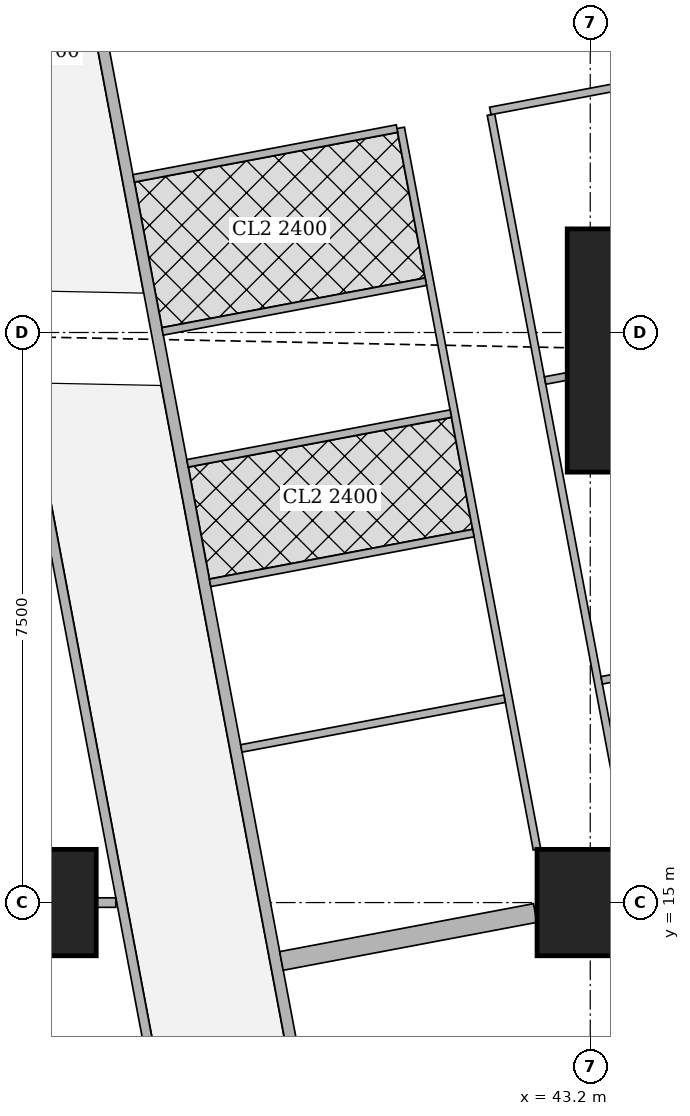
"""IFC4 building model, lengths in metres.
Left out: names, types, materials, properties, quantities, classifications, styles, units other than length and angle.
Written with IfcOpenShell. Run it as: python <this file> out.ifc"""

import sys

from ifc_helpers import new_model, si_unit, direction, frame, frame_2d, origin, origin_2d, place, context, subcontext, project, spatial, rectangle, extrude, element, fill, save


model = new_model("IFC4")
c1 = context("Model", 3, precision=1e-05, world=origin(), true_north=direction((0.0, 1.0)))
c2 = subcontext(c1, "Body", "Model", "MODEL_VIEW")
j1 = project(units=[si_unit("LENGTHUNIT", "METRE"), si_unit("PLANEANGLEUNIT", "RADIAN")], contexts=[c1])
p1 = place(None, origin())
s1 = spatial("IfcSite", under=j1, at=p1, CompositionType="ELEMENT")
p2 = place(p1, origin())
s2 = spatial("IfcBuilding", under=s1, at=p2, CompositionType="ELEMENT")
p3 = place(p2, frame((0.0, 0.0, 204.95)))
s3 = spatial("IfcBuildingStorey", under=s2, at=p3, CompositionType="ELEMENT", Elevation=204.95)
for number, where, z_axis, x_axis in (
    (1, (36.0, 15.0, 0.0), (0.0, 0.0, 1.0), (1.0, 0.0, 0.0)),
    (2, (43.2, 15.0, 0.0), (0.0, 0.0, 1.0), (1.0, 0.0, 0.0)),
):
    element("IfcColumn", number, at=place(p3, frame(where, z_axis=z_axis, x_axis=x_axis)), inside=s3, PredefinedType="COLUMN", context=c2, shape_type="SweptSolid", body=[
        extrude(rectangle(XDim=1.4, YDim=1.4, at=origin_2d()), origin(), (0.0, 0.0, 1.0), 3.75),
    ])
p4 = place(p3, frame((44.697, 22.263, 0.0), z_axis=(0.0, 0.0, 1.0), x_axis=(1.0, 0.0, 0.0)))
e3 = element("IfcColumn", 3, at=p4, inside=s3, PredefinedType="COLUMN", context=c2, shape_type="SweptSolid", body=[
    extrude(rectangle(XDim=3.6, YDim=3.2, at=origin_2d()), origin(), (0.0, 0.0, 1.0), 3.75),
])
p5 = place(p3, frame((50.653, 2.703, 0.0), z_axis=(0.0, 0.0, 1.0), x_axis=(-0.185612026696, 0.982623109613, 0.0)))
e4 = element("IfcWall", 4, at=p5, inside=s3, PredefinedType="SOLIDWALL", context=c2, shape_type="SweptSolid", body=[
    extrude(rectangle(XDim=41.393, YDim=0.2, at=frame_2d((20.697, 0.0))), origin(), (0.0, 0.0, 1.0), 3.5),
])
p6 = place(p5, frame((1.633, 0.0, 0.9)))
e5 = element("IfcOpeningElement", 5, at=p6, cuts=e4, PredefinedType="OPENING", context=c2, shape_type="SweptSolid", body=[
    extrude(rectangle(XDim=1.8, YDim=1.5, at=frame_2d((0.9, 0.75))), frame((0.0, 0.11, 0.0), z_axis=(0.0, -1.0, 0.0), x_axis=(1.0, 0.0, 0.0)), (0.0, 0.0, 1.0), 0.22),
])
p7 = place(p5, frame((6.032, 0.0, 0.9)))
e6 = element("IfcOpeningElement", 6, at=p7, cuts=e4, PredefinedType="OPENING", context=c2, shape_type="SweptSolid", body=[
    extrude(rectangle(XDim=1.8, YDim=1.5, at=frame_2d((0.9, 0.75))), frame((0.0, 0.11, 0.0), z_axis=(0.0, -1.0, 0.0), x_axis=(1.0, 0.0, 0.0)), (0.0, 0.0, 1.0), 0.22),
])
p8 = place(p5, frame((9.848, 0.0, 0.9)))
e7 = element("IfcOpeningElement", 7, at=p8, cuts=e4, PredefinedType="OPENING", context=c2, shape_type="SweptSolid", body=[
    extrude(rectangle(XDim=1.8, YDim=1.5, at=frame_2d((0.9, 0.75))), frame((0.0, 0.11, 0.0), z_axis=(0.0, -1.0, 0.0), x_axis=(1.0, 0.0, 0.0)), (0.0, 0.0, 1.0), 0.22),
])
p9 = place(p5, frame((13.664, 0.0, 0.9)))
e8 = element("IfcOpeningElement", 8, at=p9, cuts=e4, PredefinedType="OPENING", context=c2, shape_type="SweptSolid", body=[
    extrude(rectangle(XDim=1.8, YDim=1.5, at=frame_2d((0.9, 0.75))), frame((0.0, 0.11, 0.0), z_axis=(0.0, -1.0, 0.0), x_axis=(1.0, 0.0, 0.0)), (0.0, 0.0, 1.0), 0.22),
])
p10 = place(p5, frame((17.481, 0.0, 0.9)))
e9 = element("IfcOpeningElement", 9, at=p10, cuts=e4, PredefinedType="OPENING", context=c2, shape_type="SweptSolid", body=[
    extrude(rectangle(XDim=1.8, YDim=1.5, at=frame_2d((0.9, 0.75))), frame((0.0, 0.11, 0.0), z_axis=(0.0, -1.0, 0.0), x_axis=(1.0, 0.0, 0.0)), (0.0, 0.0, 1.0), 0.22),
])
p11 = place(p5, frame((21.297, 0.0, 0.9)))
e10 = element("IfcOpeningElement", 10, at=p11, cuts=e4, PredefinedType="OPENING", context=c2, shape_type="SweptSolid", body=[
    extrude(rectangle(XDim=1.8, YDim=1.5, at=frame_2d((0.9, 0.75))), frame((0.0, 0.11, 0.0), z_axis=(0.0, -1.0, 0.0), x_axis=(1.0, 0.0, 0.0)), (0.0, 0.0, 1.0), 0.22),
])
p12 = place(p5, frame((25.113, 0.0, 0.9)))
e11 = element("IfcOpeningElement", 11, at=p12, cuts=e4, PredefinedType="OPENING", context=c2, shape_type="SweptSolid", body=[
    extrude(rectangle(XDim=1.8, YDim=1.5, at=frame_2d((0.9, 0.75))), frame((0.0, 0.11, 0.0), z_axis=(0.0, -1.0, 0.0), x_axis=(1.0, 0.0, 0.0)), (0.0, 0.0, 1.0), 0.22),
])
p13 = place(p5, frame((28.93, 0.0, 0.9)))
e12 = element("IfcOpeningElement", 12, at=p13, cuts=e4, PredefinedType="OPENING", context=c2, shape_type="SweptSolid", body=[
    extrude(rectangle(XDim=1.8, YDim=1.5, at=frame_2d((0.9, 0.75))), frame((0.0, 0.11, 0.0), z_axis=(0.0, -1.0, 0.0), x_axis=(1.0, 0.0, 0.0)), (0.0, 0.0, 1.0), 0.22),
])
p14 = place(p5, frame((32.746, 0.0, 0.9)))
e13 = element("IfcOpeningElement", 13, at=p14, cuts=e4, PredefinedType="OPENING", context=c2, shape_type="SweptSolid", body=[
    extrude(rectangle(XDim=1.8, YDim=1.5, at=frame_2d((0.9, 0.75))), frame((0.0, 0.11, 0.0), z_axis=(0.0, -1.0, 0.0), x_axis=(1.0, 0.0, 0.0)), (0.0, 0.0, 1.0), 0.22),
])
p15 = place(p5, frame((36.481, 0.0, 0.9)))
e14 = element("IfcOpeningElement", 14, at=p15, cuts=e4, PredefinedType="OPENING", context=c2, shape_type="SweptSolid", body=[
    extrude(rectangle(XDim=1.8, YDim=1.5, at=frame_2d((0.9, 0.75))), frame((0.0, 0.11, 0.0), z_axis=(0.0, -1.0, 0.0), x_axis=(1.0, 0.0, 0.0)), (0.0, 0.0, 1.0), 0.22),
])
p16 = place(p3, frame((33.68, 42.723, 0.0), z_axis=(0.0, 0.0, 1.0), x_axis=(0.185601160014, -0.982625162207, 0.0)))
e15 = element("IfcWall", 15, at=p16, inside=s3, PredefinedType="SOLIDWALL", context=c2, shape_type="SweptSolid", body=[
    extrude(rectangle(XDim=41.051, YDim=0.15, at=frame_2d((20.526, 0.0))), origin(), (0.0, 0.0, 1.0), 2.5),
])
p17 = place(p16, frame((12.307, 0.0, 0.0)))
e16 = element("IfcOpeningElement", 16, at=p17, cuts=e15, PredefinedType="OPENING", context=c2, shape_type="SweptSolid", body=[
    extrude(rectangle(XDim=1.0, YDim=2.1, at=frame_2d((0.5, 1.05))), frame((0.0, 0.085, 0.0), z_axis=(0.0, -1.0, 0.0), x_axis=(1.0, 0.0, 0.0)), (0.0, 0.0, 1.0), 0.17),
])
p18 = place(p16, frame((16.123, 0.0, 0.0)))
e17 = element("IfcOpeningElement", 17, at=p18, cuts=e15, PredefinedType="OPENING", context=c2, shape_type="SweptSolid", body=[
    extrude(rectangle(XDim=1.0, YDim=2.1, at=frame_2d((0.5, 1.05))), frame((0.0, 0.085, 0.0), z_axis=(0.0, -1.0, 0.0), x_axis=(1.0, 0.0, 0.0)), (0.0, 0.0, 1.0), 0.17),
])
p19 = place(p16, frame((30.902, 0.0, 0.0)))
e18 = element("IfcOpeningElement", 18, at=p19, cuts=e15, PredefinedType="OPENING", context=c2, shape_type="SweptSolid", body=[
    extrude(rectangle(XDim=1.0, YDim=2.1, at=frame_2d((0.5, 1.05))), frame((0.0, 0.085, 0.0), z_axis=(0.0, -1.0, 0.0), x_axis=(1.0, 0.0, 0.0)), (0.0, 0.0, 1.0), 0.17),
])
p20 = place(p3, frame((41.894, 25.366, 0.0), z_axis=(0.0, 0.0, 1.0), x_axis=(0.185612905165, -0.982622943675, 0.0)))
e19 = element("IfcWall", 19, at=p20, inside=s3, PredefinedType="PARTITIONING", context=c2, shape_type="SweptSolid", body=[
    extrude(rectangle(XDim=9.827, YDim=0.1, at=frame_2d((4.913, 0.0))), origin(), (0.0, 0.0, 1.0), 2.5),
])
p21 = place(p20, frame((0.151, 0.0, 0.0)))
e20 = element("IfcOpeningElement", 20, at=p21, cuts=e19, PredefinedType="OPENING", context=c2, shape_type="SweptSolid", body=[
    extrude(rectangle(XDim=0.9, YDim=2.1, at=frame_2d((0.45, 1.05))), frame((0.0, 0.06, 0.0), z_axis=(0.0, -1.0, 0.0), x_axis=(1.0, 0.0, 0.0)), (0.0, 0.0, 1.0), 0.12),
])
p22 = place(p20, frame((5.05, 0.0, 0.0)))
e21 = element("IfcOpeningElement", 21, at=p22, cuts=e19, PredefinedType="OPENING", context=c2, shape_type="SweptSolid", body=[
    extrude(rectangle(XDim=0.9, YDim=2.1, at=frame_2d((0.45, 1.05))), frame((0.0, 0.06, 0.0), z_axis=(0.0, -1.0, 0.0), x_axis=(1.0, 0.0, 0.0)), (0.0, 0.0, 1.0), 0.12),
])
p23 = place(p20, frame((7.783, 0.0, 0.0)))
e22 = element("IfcOpeningElement", 22, at=p23, cuts=e19, PredefinedType="OPENING", context=c2, shape_type="SweptSolid", body=[
    extrude(rectangle(XDim=0.9, YDim=2.1, at=frame_2d((0.45, 1.05))), frame((0.0, 0.06, 0.0), z_axis=(0.0, -1.0, 0.0), x_axis=(1.0, 0.0, 0.0)), (0.0, 0.0, 1.0), 0.12),
])
p24 = place(p3, frame((40.706, 25.192, 0.0), z_axis=(0.0, 0.0, 1.0), x_axis=(0.185629824463, -0.982619747547, 0.0)))
e23 = element("IfcWall", 23, at=p24, inside=s3, PredefinedType="PARTITIONING", context=c2, shape_type="SweptSolid", body=[
    extrude(rectangle(XDim=9.659, YDim=0.1, at=frame_2d((4.83, 0.0))), origin(), (0.0, 0.0, 1.0), 2.5),
])
p25 = place(p24, frame((0.575, 0.0, 0.0)))
e24 = element("IfcOpeningElement", 24, at=p25, cuts=e23, PredefinedType="OPENING", context=c2, shape_type="SweptSolid", body=[
    extrude(rectangle(XDim=0.9, YDim=2.1, at=frame_2d((0.45, 1.05))), frame((0.0, 0.06, 0.0), z_axis=(0.0, -1.0, 0.0), x_axis=(1.0, 0.0, 0.0)), (0.0, 0.0, 1.0), 0.12),
])
p26 = place(p24, frame((4.166, 0.0, 0.0)))
e25 = element("IfcOpeningElement", 25, at=p26, cuts=e23, PredefinedType="OPENING", context=c2, shape_type="SweptSolid", body=[
    extrude(rectangle(XDim=0.9, YDim=2.1, at=frame_2d((0.45, 1.05))), frame((0.0, 0.06, 0.0), z_axis=(0.0, -1.0, 0.0), x_axis=(1.0, 0.0, 0.0)), (0.0, 0.0, 1.0), 0.12),
])
p27 = place(p24, frame((2.483, 0.0, 0.0)))
e26 = element("IfcOpeningElement", 26, at=p27, cuts=e23, PredefinedType="OPENING", context=c2, shape_type="SweptSolid", body=[
    extrude(rectangle(XDim=0.9, YDim=2.1, at=frame_2d((0.45, 1.05))), frame((0.0, 0.06, 0.0), z_axis=(0.0, -1.0, 0.0), x_axis=(1.0, 0.0, 0.0)), (0.0, 0.0, 1.0), 0.12),
])
p28 = place(p24, frame((6.074, 0.0, 0.0)))
e27 = element("IfcOpeningElement", 27, at=p28, cuts=e23, PredefinedType="OPENING", context=c2, shape_type="SweptSolid", body=[
    extrude(rectangle(XDim=0.9, YDim=2.1, at=frame_2d((0.45, 1.05))), frame((0.0, 0.06, 0.0), z_axis=(0.0, -1.0, 0.0), x_axis=(1.0, 0.0, 0.0)), (0.0, 0.0, 1.0), 0.12),
])
p29 = place(p3, frame((46.11, 26.213, 0.0), z_axis=(0.0, 0.0, 1.0), x_axis=(-0.982633535512, -0.185556823879, 0.0)))
e28 = element("IfcWall", 28, at=p29, inside=s3, PredefinedType="PARTITIONING", context=c2, shape_type="SweptSolid", body=[
    extrude(rectangle(XDim=4.3, YDim=0.1, at=frame_2d((2.15, 0.0))), origin(), (0.0, 0.0, 1.0), 2.05),
])
p30 = place(p3, frame((42.887, 21.921, 0.0), z_axis=(0.0, 0.0, 1.0), x_axis=(-0.982688058078, -0.185267861514, 0.0)))
e29 = element("IfcWall", 29, at=p30, inside=s3, PredefinedType="PARTITIONING", context=c2, shape_type="SweptSolid", body=[
    extrude(rectangle(XDim=0.286, YDim=0.1, at=frame_2d((0.143, 0.0))), origin(), (0.0, 0.0, 1.0), 2.5),
])
p31 = place(p3, frame((47.527, 18.712, 0.0), z_axis=(0.0, 0.0, 1.0), x_axis=(-0.982665405803, -0.185387972203, 0.0)))
e30 = element("IfcWall", 30, at=p31, inside=s3, PredefinedType="PARTITIONING", context=c2, shape_type="SweptSolid", body=[
    extrude(rectangle(XDim=4.25, YDim=0.1, at=frame_2d((2.125, 0.0))), origin(), (0.0, 0.0, 1.0), 2.05),
])
p32 = place(p3, frame((40.657, 25.183, 0.0), z_axis=(0.0, 0.0, 1.0), x_axis=(-0.982585626838, -0.185810349366, 0.0)))
e31 = element("IfcWall", 31, at=p32, inside=s3, PredefinedType="PARTITIONING", context=c2, shape_type="SweptSolid", body=[
    extrude(rectangle(XDim=3.525, YDim=0.1, at=frame_2d((1.763, 0.0))), origin(), (0.0, 0.0, 1.0), 3.5),
])
p33 = place(p3, frame((41.365, 21.433, 0.0), z_axis=(0.0, 0.0, 1.0), x_axis=(-0.982638553676, -0.185530247748, 0.0)))
e32 = element("IfcWall", 32, at=p33, inside=s3, PredefinedType="PARTITIONING", context=c2, shape_type="SweptSolid", body=[
    extrude(rectangle(XDim=3.525, YDim=0.1, at=frame_2d((1.763, 0.0))), origin(), (0.0, 0.0, 1.0), 3.5),
])
p34 = place(p3, frame((42.073, 17.682, 0.0), z_axis=(0.0, 0.0, 1.0), x_axis=(-0.98265117712, -0.185463376723, 0.0)))
e33 = element("IfcWall", 33, at=p34, inside=s3, PredefinedType="PARTITIONING", context=c2, shape_type="SweptSolid", body=[
    extrude(rectangle(XDim=3.525, YDim=0.1, at=frame_2d((1.763, 0.0))), origin(), (0.0, 0.0, 1.0), 3.5),
])
p35 = place(p34, frame((1.325, 0.0, 0.0)))
e34 = element("IfcOpeningElement", 34, at=p35, cuts=e33, PredefinedType="OPENING", context=c2, shape_type="SweptSolid", body=[
    extrude(rectangle(XDim=0.9, YDim=2.1, at=frame_2d((0.45, 1.05))), frame((0.0, 0.06, 0.0), z_axis=(0.0, -1.0, 0.0), x_axis=(1.0, 0.0, 0.0)), (0.0, 0.0, 1.0), 0.12),
])
p36 = place(p3, frame((41.037, 23.168, 0.0), z_axis=(0.0, 0.0, 1.0), x_axis=(-0.982638553676, -0.185530247748, 0.0)))
e35 = element("IfcWall", 35, at=p36, inside=s3, PredefinedType="PARTITIONING", context=c2, shape_type="SweptSolid", body=[
    extrude(rectangle(XDim=3.525, YDim=0.1, at=frame_2d((1.763, 0.0))), origin(), (0.0, 0.0, 1.0), 2.5),
])
p37 = place(p3, frame((41.662, 19.861, 0.0), z_axis=(0.0, 0.0, 1.0), x_axis=(-0.982588017646, -0.185797706064, 0.0)))
e36 = element("IfcWall", 36, at=p37, inside=s3, PredefinedType="PARTITIONING", context=c2, shape_type="SweptSolid", body=[
    extrude(rectangle(XDim=3.525, YDim=0.1, at=frame_2d((1.763, 0.0))), origin(), (0.0, 0.0, 1.0), 3.5),
])
p38 = place(p3, frame((42.476, 14.863, 0.0), z_axis=(0.0, 0.0, 1.0), x_axis=(-0.982603567712, -0.185715450942, 0.0)))
e37 = element("IfcWall", 37, at=p38, inside=s3, PredefinedType="SOLIDWALL", context=c2, shape_type="SweptSolid", body=[
    extrude(rectangle(XDim=3.398, YDim=0.25, at=frame_2d((1.699, 0.0))), origin(), (0.0, 0.0, 1.0), 3.5),
])
p39 = place(p3, frame((37.9, 10.413, 0.0), z_axis=(0.0, 0.0, 1.0), x_axis=(-0.185589740669, 0.982627319058, 0.0)))
e38 = element("IfcWall", 38, at=p39, inside=s3, PredefinedType="PARTITIONING", context=c2, shape_type="SweptSolid", body=[
    extrude(rectangle(XDim=24.602, YDim=0.125, at=frame_2d((12.301, 0.0))), origin(), (0.0, 0.0, 1.0), 2.5),
])
p40 = place(p39, frame((0.708, 0.0, 0.0)))
e39 = element("IfcOpeningElement", 39, at=p40, cuts=e38, PredefinedType="OPENING", context=c2, shape_type="SweptSolid", body=[
    extrude(rectangle(XDim=1.0, YDim=2.1, at=frame_2d((0.5, 1.05))), frame((0.0, 0.073, 0.0), z_axis=(0.0, -1.0, 0.0), x_axis=(1.0, 0.0, 0.0)), (0.0, 0.0, 1.0), 0.145),
])
p41 = place(p39, frame((5.65, 0.0, 0.0)))
e40 = element("IfcOpeningElement", 40, at=p41, cuts=e38, PredefinedType="OPENING", context=c2, shape_type="SweptSolid", body=[
    extrude(rectangle(XDim=1.0, YDim=2.1, at=frame_2d((0.5, 1.05))), frame((0.0, 0.073, 0.0), z_axis=(0.0, -1.0, 0.0), x_axis=(1.0, 0.0, 0.0)), (0.0, 0.0, 1.0), 0.145),
])
p42 = place(p39, frame((13.124, 0.0, 0.0)))
e41 = element("IfcOpeningElement", 41, at=p42, cuts=e38, PredefinedType="OPENING", context=c2, shape_type="SweptSolid", body=[
    extrude(rectangle(XDim=1.0, YDim=2.1, at=frame_2d((0.5, 1.05))), frame((0.0, 0.073, 0.0), z_axis=(0.0, -1.0, 0.0), x_axis=(1.0, 0.0, 0.0)), (0.0, 0.0, 1.0), 0.145),
])
p43 = place(p39, frame((16.94, 0.0, 0.0)))
e42 = element("IfcOpeningElement", 42, at=p43, cuts=e38, PredefinedType="OPENING", context=c2, shape_type="SweptSolid", body=[
    extrude(rectangle(XDim=1.0, YDim=2.1, at=frame_2d((0.5, 1.05))), frame((0.0, 0.073, 0.0), z_axis=(0.0, -1.0, 0.0), x_axis=(1.0, 0.0, 0.0)), (0.0, 0.0, 1.0), 0.145),
])
p44 = place(p39, frame((20.9, 0.0, 0.0)))
e43 = element("IfcOpeningElement", 43, at=p44, cuts=e38, PredefinedType="OPENING", context=c2, shape_type="SweptSolid", body=[
    extrude(rectangle(XDim=1.0, YDim=2.1, at=frame_2d((0.5, 1.05))), frame((0.0, 0.073, 0.0), z_axis=(0.0, -1.0, 0.0), x_axis=(1.0, 0.0, 0.0)), (0.0, 0.0, 1.0), 0.145),
])
p45 = place(p3, frame((36.701, 15.0, 0.0), z_axis=(0.0, 0.0, 1.0), x_axis=(1.0, 0.0, 0.0)))
e44 = element("IfcWall", 44, at=p45, inside=s3, PredefinedType="PARTITIONING", context=c2, shape_type="SweptSolid", body=[
    extrude(rectangle(XDim=0.257, YDim=0.125, at=frame_2d((0.128, 0.0))), origin(), (0.0, 0.0, 1.0), 3.5),
])
p46 = place(p21, origin())
e45 = element("IfcDoor", 45, at=p46, inside=s3, OperationType="SINGLE_SWING_LEFT", PredefinedType="DOOR", context=c2, shape_type="SweptSolid", body=[
    extrude(rectangle(XDim=0.9, YDim=2.1, at=frame_2d((0.45, 1.05))), frame((0.0, 0.025, 0.0), z_axis=(0.0, -1.0, 0.0), x_axis=(1.0, 0.0, 0.0)), (0.0, 0.0, 1.0), 0.05),
])
fill(e20, e45)
p47 = place(p22, origin())
e46 = element("IfcDoor", 46, at=p47, inside=s3, OperationType="SINGLE_SWING_LEFT", PredefinedType="DOOR", context=c2, shape_type="SweptSolid", body=[
    extrude(rectangle(XDim=0.9, YDim=2.1, at=frame_2d((0.45, 1.05))), frame((0.0, 0.025, 0.0), z_axis=(0.0, -1.0, 0.0), x_axis=(1.0, 0.0, 0.0)), (0.0, 0.0, 1.0), 0.05),
])
fill(e21, e46)
p48 = place(p23, origin())
e47 = element("IfcDoor", 47, at=p48, inside=s3, OperationType="SINGLE_SWING_LEFT", PredefinedType="DOOR", context=c2, shape_type="SweptSolid", body=[
    extrude(rectangle(XDim=0.9, YDim=2.1, at=frame_2d((0.45, 1.05))), frame((0.0, 0.025, 0.0), z_axis=(0.0, -1.0, 0.0), x_axis=(1.0, 0.0, 0.0)), (0.0, 0.0, 1.0), 0.05),
])
fill(e22, e47)
p49 = place(p25, origin())
e48 = element("IfcDoor", 48, at=p49, inside=s3, OperationType="SINGLE_SWING_RIGHT", PredefinedType="DOOR", context=c2, shape_type="SweptSolid", body=[
    extrude(rectangle(XDim=0.9, YDim=2.1, at=frame_2d((0.45, 1.05))), frame((0.0, 0.025, 0.0), z_axis=(0.0, -1.0, 0.0), x_axis=(1.0, 0.0, 0.0)), (0.0, 0.0, 1.0), 0.05),
])
fill(e24, e48)
p50 = place(p26, origin())
e49 = element("IfcDoor", 49, at=p50, inside=s3, OperationType="SINGLE_SWING_LEFT", PredefinedType="DOOR", context=c2, shape_type="SweptSolid", body=[
    extrude(rectangle(XDim=0.9, YDim=2.1, at=frame_2d((0.45, 1.05))), frame((0.0, 0.025, 0.0), z_axis=(0.0, -1.0, 0.0), x_axis=(1.0, 0.0, 0.0)), (0.0, 0.0, 1.0), 0.05),
])
fill(e25, e49)
p51 = place(p27, origin())
e50 = element("IfcDoor", 50, at=p51, inside=s3, OperationType="SINGLE_SWING_LEFT", PredefinedType="DOOR", context=c2, shape_type="SweptSolid", body=[
    extrude(rectangle(XDim=0.9, YDim=2.1, at=frame_2d((0.45, 1.05))), frame((0.0, 0.025, 0.0), z_axis=(0.0, -1.0, 0.0), x_axis=(1.0, 0.0, 0.0)), (0.0, 0.0, 1.0), 0.05),
])
fill(e26, e50)
p52 = place(p28, origin())
e51 = element("IfcDoor", 51, at=p52, inside=s3, OperationType="SINGLE_SWING_RIGHT", PredefinedType="DOOR", context=c2, shape_type="SweptSolid", body=[
    extrude(rectangle(XDim=0.9, YDim=2.1, at=frame_2d((0.45, 1.05))), frame((0.0, 0.025, 0.0), z_axis=(0.0, -1.0, 0.0), x_axis=(1.0, 0.0, 0.0)), (0.0, 0.0, 1.0), 0.05),
])
fill(e27, e51)
p53 = place(p18, origin())
e52 = element("IfcDoor", 52, at=p53, inside=s3, OperationType="SINGLE_SWING_RIGHT", PredefinedType="DOOR", context=c2, shape_type="SweptSolid", body=[
    extrude(rectangle(XDim=1.0, YDim=2.1, at=frame_2d((0.5, 1.05))), frame((0.0, 0.025, 0.0), z_axis=(0.0, -1.0, 0.0), x_axis=(1.0, 0.0, 0.0)), (0.0, 0.0, 1.0), 0.05),
])
fill(e17, e52)
p54 = place(p35, origin())
e53 = element("IfcDoor", 53, at=p54, inside=s3, OperationType="SINGLE_SWING_LEFT", PredefinedType="DOOR", context=c2, shape_type="SweptSolid", body=[
    extrude(rectangle(XDim=0.9, YDim=2.1, at=frame_2d((0.45, 1.05))), frame((0.0, 0.025, 0.0), z_axis=(0.0, -1.0, 0.0), x_axis=(1.0, 0.0, 0.0)), (0.0, 0.0, 1.0), 0.05),
])
fill(e34, e53)
p55 = place(p41, origin())
e54 = element("IfcDoor", 54, at=p55, inside=s3, OperationType="SINGLE_SWING_LEFT", PredefinedType="DOOR", context=c2, shape_type="SweptSolid", body=[
    extrude(rectangle(XDim=1.0, YDim=2.1, at=frame_2d((0.5, 1.05))), frame((0.0, 0.025, 0.0), z_axis=(0.0, -1.0, 0.0), x_axis=(1.0, 0.0, 0.0)), (0.0, 0.0, 1.0), 0.05),
])
fill(e40, e54)
save(model, sys.argv[1])
